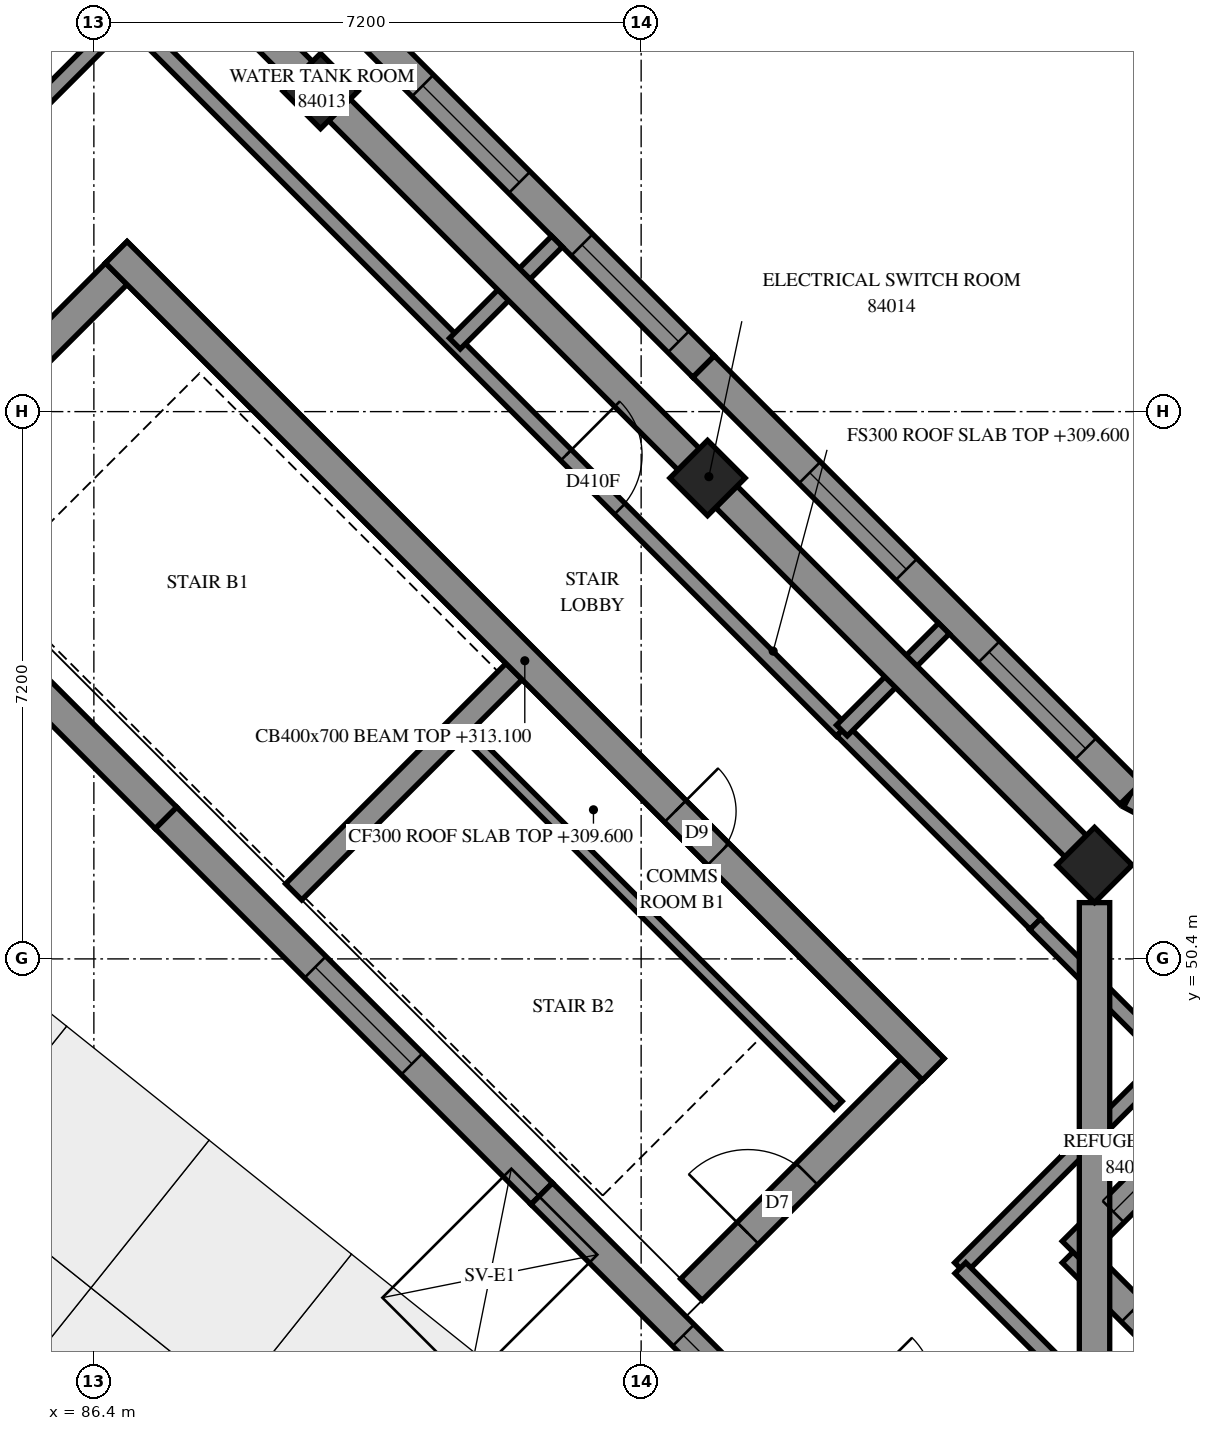
"""IFC4 building model, lengths in metres.
Left out: names, types, materials, properties, quantities, classifications, styles, units other than length and angle.
Written with IfcOpenShell. Run it as: python <this file> out.ifc"""

import sys

from ifc_helpers import new_model, si_unit, direction, frame, frame_2d, origin, origin_2d, place, context, subcontext, project, spatial, polyline, rectangle, outline, extrude, element, fill, save


model = new_model("IFC4")
c1 = context("Model", 3, precision=1e-05, world=origin(), true_north=direction((0.0, 1.0)))
c2 = subcontext(c1, "Body", "Model", "MODEL_VIEW")
j1 = project(units=[si_unit("LENGTHUNIT", "METRE"), si_unit("PLANEANGLEUNIT", "RADIAN")], contexts=[c1])
p1 = place(None, origin())
s1 = spatial("IfcSite", under=j1, at=p1, CompositionType="ELEMENT")
p2 = place(p1, origin())
s2 = spatial("IfcBuilding", under=s1, at=p2, CompositionType="ELEMENT")
p3 = place(p2, frame((0.0, 0.0, 309.6)))
s3 = spatial("IfcBuildingStorey", under=s2, at=p3, CompositionType="ELEMENT", Elevation=309.6)
for number, where, z_axis, x_axis in (
    (1, (89.382, 61.818, 0.0), (0.0, 0.0, 1.0), (0.707, -0.707, 0.0)),
    (2, (94.474, 56.727, 0.0), (0.0, 0.0, 1.0), (0.707, -0.707, 0.0)),
    (3, (99.565, 51.635, 0.0), (0.0, 0.0, 1.0), (0.707, -0.707, 0.0)),
):
    element("IfcColumn", number, at=place(p3, frame(where, z_axis=z_axis, x_axis=x_axis)), inside=s3, PredefinedType="COLUMN", context=c2, shape_type="SweptSolid", body=[
        extrude(rectangle(XDim=0.7, YDim=0.7, at=origin_2d()), origin(), (0.0, 0.0, 1.0), 3.5),
    ])
p4 = place(p3, frame((86.695, 59.696, -0.3), z_axis=(0.0, 0.0, 1.0), x_axis=(0.7071100706, -0.7071034917, 0.0)))
e4 = element("IfcWall", 4, at=p4, inside=s3, PredefinedType="SHEAR", context=c2, shape_type="SweptSolid", body=[
    extrude(outline(polyline([(0.0, 0.0), (15.2, 0.0), (15.2, 3.1), (0.0, 3.1), (0.0, 0.0)])), frame((0.0, 0.2, 0.0), z_axis=(0.0, -1.0, 0.0), x_axis=(1.0, 0.0, 0.0)), (0.0, 0.0, 1.0), 0.4),
])
p5 = place(p4, frame((10.4, 0.0, 0.3)))
e5 = element("IfcOpeningElement", 5, at=p5, cuts=e4, PredefinedType="OPENING", context=c2, shape_type="SweptSolid", body=[
    extrude(rectangle(XDim=0.8, YDim=2.1, at=frame_2d((0.4, 1.05))), frame((0.0, 0.21, 0.0), z_axis=(0.0, -1.0, 0.0), x_axis=(1.0, 0.0, 0.0)), (0.0, 0.0, 1.0), 0.42),
])
p6 = place(p3, frame((83.796, 56.514, -0.3), z_axis=(0.0, 0.0, 1.0), x_axis=(0.7071067812, 0.7071067812, 0.0)))
e6 = element("IfcWall", 6, at=p6, inside=s3, PredefinedType="SHEAR", context=c2, shape_type="SweptSolid", body=[
    extrude(outline(polyline([(0.0, 0.0), (4.1, 0.0), (4.1, 3.1), (0.0, 3.1), (0.0, 0.0)])), frame((0.0, 0.2, 0.0), z_axis=(0.0, -1.0, 0.0), x_axis=(1.0, 0.0, 0.0)), (0.0, 0.0, 1.0), 0.4),
])
p7 = place(p6, frame((1.05, 0.0, 0.3)))
e7 = element("IfcOpeningElement", 7, at=p7, cuts=e6, PredefinedType="OPENING", context=c2, shape_type="SweptSolid", body=[
    extrude(rectangle(XDim=1.1, YDim=2.1, at=frame_2d((0.55, 1.05))), frame((0.0, 0.21, 0.0), z_axis=(0.0, -1.0, 0.0), x_axis=(1.0, 0.0, 0.0)), (0.0, 0.0, 1.0), 0.42),
])
p8 = place(p3, frame((94.261, 46.049, -0.3), z_axis=(0.0, 0.0, 1.0), x_axis=(0.7071067812, 0.7071067812, 0.0)))
e8 = element("IfcWall", 8, at=p8, inside=s3, PredefinedType="SHEAR", context=c2, shape_type="SweptSolid", body=[
    extrude(outline(polyline([(0.0, 0.0), (4.1, 0.0), (4.1, 3.1), (0.0, 3.1), (0.0, 0.0)])), frame((0.0, 0.2, 0.0), z_axis=(0.0, -1.0, 0.0), x_axis=(1.0, 0.0, 0.0)), (0.0, 0.0, 1.0), 0.4),
])
p9 = place(p8, frame((1.05, 0.0, 0.3)))
e9 = element("IfcOpeningElement", 9, at=p9, cuts=e8, PredefinedType="OPENING", context=c2, shape_type="SweptSolid", body=[
    extrude(rectangle(XDim=1.1, YDim=2.1, at=frame_2d((0.55, 1.05))), frame((0.0, 0.21, 0.0), z_axis=(0.0, -1.0, 0.0), x_axis=(1.0, 0.0, 0.0)), (0.0, 0.0, 1.0), 0.42),
])
p10 = place(p3, frame((89.029, 51.282, 0.0), z_axis=(0.0, 0.0, 1.0), x_axis=(0.7071067812, 0.7071067812, 0.0)))
e10 = element("IfcWall", 10, at=p10, inside=s3, PredefinedType="SOLIDWALL", context=c2, shape_type="SweptSolid", body=[
    extrude(outline(polyline([(0.0, 0.0), (4.1, 0.0), (4.1, 3.5), (0.0, 3.5), (0.0, 0.0)])), frame((0.0, 0.15, 0.0), z_axis=(0.0, -1.0, 0.0), x_axis=(1.0, 0.0, 0.0)), (0.0, 0.0, 1.0), 0.3),
])
p11 = place(p3, frame((102.676, 43.15, 0.0), z_axis=(0.0, 0.0, 1.0), x_axis=(-0.7070963646, 0.7071171977, 0.0)))
e11 = element("IfcWall", 11, at=p11, inside=s3, PredefinedType="SOLIDWALL", context=c2, shape_type="SweptSolid", body=[
    extrude(outline(polyline([(-0.2, -0.2), (4.6, -0.2), (5.0, 0.2), (0.2, 0.2), (-0.2, -0.2)])), origin(), (0.0, 0.0, 1.0), 3.5),
])
p12 = place(p11, frame((1.9, 0.0, 0.7)))
e12 = element("IfcOpeningElement", 12, at=p12, cuts=e11, PredefinedType="OPENING", context=c2, shape_type="SweptSolid", body=[
    extrude(rectangle(XDim=1.8, YDim=2.2, at=frame_2d((0.9, 1.1))), frame((0.0, 0.21, 0.0), z_axis=(0.0, -1.0, 0.0), x_axis=(1.0, 0.0, 0.0)), (0.0, 0.0, 1.0), 0.42),
])
p13 = place(p3, frame((99.282, 46.544, 0.0), z_axis=(0.0, 0.0, 1.0), x_axis=(0.7071067812, 0.7071067812, 0.0)))
e13 = element("IfcWall", 13, at=p13, inside=s3, PredefinedType="SOLIDWALL", context=c2, shape_type="SweptSolid", body=[
    extrude(outline(polyline([(0.2, -0.2), (6.23, -0.2), (5.687, 0.2), (-0.2, 0.2), (0.2, -0.2)])), origin(), (0.0, 0.0, 1.0), 3.5),
])
p14 = place(p13, frame((0.75, 0.0, 0.7)))
e14 = element("IfcOpeningElement", 14, at=p14, cuts=e13, PredefinedType="OPENING", context=c2, shape_type="SweptSolid", body=[
    extrude(rectangle(XDim=1.8, YDim=2.2, at=frame_2d((0.9, 1.1))), frame((0.0, 0.21, 0.0), z_axis=(0.0, -1.0, 0.0), x_axis=(1.0, 0.0, 0.0)), (0.0, 0.0, 1.0), 0.42),
])
p15 = place(p3, frame((103.495, 50.757, 0.0), z_axis=(0.0, 0.0, 1.0), x_axis=(-0.8850848595, 0.4654296848, 0.0)))
e15 = element("IfcWall", 15, at=p15, inside=s3, PredefinedType="SOLIDWALL", context=c2, shape_type="SweptSolid", body=[
    extrude(outline(polyline([(-0.272, -0.2), (3.873, -0.2), (3.934, 0.2), (0.272, 0.2), (-0.272, -0.2)])), origin(), (0.0, 0.0, 1.0), 3.5),
])
p16 = place(p15, frame((1.116, 0.0, 0.7)))
e16 = element("IfcOpeningElement", 16, at=p16, cuts=e15, PredefinedType="OPENING", context=c2, shape_type="SweptSolid", body=[
    extrude(rectangle(XDim=1.8, YDim=2.2, at=frame_2d((0.9, 1.1))), frame((0.0, 0.21, 0.0), z_axis=(0.0, -1.0, 0.0), x_axis=(1.0, 0.0, 0.0)), (0.0, 0.0, 1.0), 0.42),
])
p17 = place(p3, frame((100.04, 52.574, 0.0), z_axis=(0.0, 0.0, 1.0), x_axis=(-0.7071004896, 0.7071130728, 0.0)))
e17 = element("IfcWall", 17, at=p17, inside=s3, PredefinedType="SOLIDWALL", context=c2, shape_type="SweptSolid", body=[
    extrude(outline(polyline([(0.03, -0.2), (7.947, -0.2), (7.947, 0.2), (-0.03, 0.2), (0.03, -0.2)])), origin(), (0.0, 0.0, 1.0), 3.5),
])
p18 = place(p17, frame((0.836, 0.0, 0.7)))
e18 = element("IfcOpeningElement", 18, at=p18, cuts=e17, PredefinedType="OPENING", context=c2, shape_type="SweptSolid", body=[
    extrude(rectangle(XDim=1.8, YDim=2.2, at=frame_2d((0.9, 1.1))), frame((0.0, 0.21, 0.0), z_axis=(0.0, -1.0, 0.0), x_axis=(1.0, 0.0, 0.0)), (0.0, 0.0, 1.0), 0.42),
])
p19 = place(p17, frame((4.172, 0.0, 0.7)))
e19 = element("IfcOpeningElement", 19, at=p19, cuts=e17, PredefinedType="OPENING", context=c2, shape_type="SweptSolid", body=[
    extrude(rectangle(XDim=1.8, YDim=2.2, at=frame_2d((0.9, 1.1))), frame((0.0, 0.21, 0.0), z_axis=(0.0, -1.0, 0.0), x_axis=(1.0, 0.0, 0.0)), (0.0, 0.0, 1.0), 0.42),
])
p20 = place(p3, frame((94.42, 58.194, 0.0), z_axis=(0.0, 0.0, 1.0), x_axis=(-0.7071067812, 0.7071067812, 0.0)))
e20 = element("IfcWall", 20, at=p20, inside=s3, PredefinedType="SOLIDWALL", context=c2, shape_type="SweptSolid", body=[
    extrude(outline(polyline([(0.0, -0.2), (7.917, -0.2), (7.917, 0.2), (0.0, 0.2), (0.0, -0.2)])), origin(), (0.0, 0.0, 1.0), 3.5),
])
p21 = place(p20, frame((0.462, 0.0, 0.7)))
e21 = element("IfcOpeningElement", 21, at=p21, cuts=e20, PredefinedType="OPENING", context=c2, shape_type="SweptSolid", body=[
    extrude(rectangle(XDim=1.8, YDim=2.2, at=frame_2d((0.9, 1.1))), frame((0.0, 0.21, 0.0), z_axis=(0.0, -1.0, 0.0), x_axis=(1.0, 0.0, 0.0)), (0.0, 0.0, 1.0), 0.42),
])
p22 = place(p20, frame((3.425, 0.0, 0.7)))
e22 = element("IfcOpeningElement", 22, at=p22, cuts=e20, PredefinedType="OPENING", context=c2, shape_type="SweptSolid", body=[
    extrude(rectangle(XDim=1.8, YDim=2.2, at=frame_2d((0.9, 1.1))), frame((0.0, 0.21, 0.0), z_axis=(0.0, -1.0, 0.0), x_axis=(1.0, 0.0, 0.0)), (0.0, 0.0, 1.0), 0.42),
])
p23 = place(p3, frame((82.406, 57.197, 0.0), z_axis=(0.0, 0.0, 1.0), x_axis=(0.7071067812, -0.7071067812, 0.0)))
e23 = element("IfcWall", 23, at=p23, inside=s3, PredefinedType="SOLIDWALL", context=c2, shape_type="SweptSolid", body=[
    extrude(outline(polyline([(0.0, -0.2), (6.99, -0.2), (6.99, 0.2), (0.0, 0.2), (0.0, -0.2)])), origin(), (0.0, 0.0, 1.0), 3.5),
])
p24 = place(p23, frame((2.565, 0.0, 0.7)))
e24 = element("IfcOpeningElement", 24, at=p24, cuts=e23, PredefinedType="OPENING", context=c2, shape_type="SweptSolid", body=[
    extrude(rectangle(XDim=1.8, YDim=2.2, at=frame_2d((0.9, 1.1))), frame((0.0, 0.21, 0.0), z_axis=(0.0, -1.0, 0.0), x_axis=(1.0, 0.0, 0.0)), (0.0, 0.0, 1.0), 0.42),
])
p25 = place(p3, frame((87.349, 52.254, 0.0), z_axis=(0.0, 0.0, 1.0), x_axis=(0.7071139341, -0.7070996282, 0.0)))
e25 = element("IfcWall", 25, at=p25, inside=s3, PredefinedType="SOLIDWALL", context=c2, shape_type="SweptSolid", body=[
    extrude(outline(polyline([(0.0, -0.2), (6.99, -0.2), (6.99, 0.2), (0.0, 0.2), (0.0, -0.2)])), origin(), (0.0, 0.0, 1.0), 3.5),
])
p26 = place(p25, frame((2.775, 0.0, 0.7)))
e26 = element("IfcOpeningElement", 26, at=p26, cuts=e25, PredefinedType="OPENING", context=c2, shape_type="SweptSolid", body=[
    extrude(rectangle(XDim=1.8, YDim=2.2, at=frame_2d((0.9, 1.1))), frame((0.0, 0.21, 0.0), z_axis=(0.0, -1.0, 0.0), x_axis=(1.0, 0.0, 0.0)), (0.0, 0.0, 1.0), 0.42),
])
p27 = place(p3, frame((92.292, 47.312, 0.0), z_axis=(0.0, 0.0, 1.0), x_axis=(0.707099663, -0.7071138993, 0.0)))
e27 = element("IfcWall", 27, at=p27, inside=s3, PredefinedType="SOLIDWALL", context=c2, shape_type="SweptSolid", body=[
    extrude(outline(polyline([(0.0, -0.2), (6.99, -0.2), (7.059, 0.2), (0.0, 0.2), (0.0, -0.2)])), origin(), (0.0, 0.0, 1.0), 3.5),
])
p28 = place(p27, frame((2.635, 0.0, 0.7)))
e28 = element("IfcOpeningElement", 28, at=p28, cuts=e27, PredefinedType="OPENING", context=c2, shape_type="SweptSolid", body=[
    extrude(rectangle(XDim=1.8, YDim=2.2, at=frame_2d((0.9, 1.1))), frame((0.0, 0.21, 0.0), z_axis=(0.0, -1.0, 0.0), x_axis=(1.0, 0.0, 0.0)), (0.0, 0.0, 1.0), 0.42),
])
p29 = place(p3, frame((91.313, 53.354, 0.0), z_axis=(0.0, 0.0, 1.0), x_axis=(0.7071140275, -0.7070995348, 0.0)))
e29 = element("IfcWall", 29, at=p29, inside=s3, PredefinedType="PARTITIONING", context=c2, shape_type="SweptSolid", body=[
    extrude(outline(polyline([(0.0, 0.0), (6.9, 0.0), (6.9, 3.5), (0.0, 3.5), (0.0, 0.0)])), frame((0.0, 0.075, 0.0), z_axis=(0.0, -1.0, 0.0), x_axis=(1.0, 0.0, 0.0)), (0.0, 0.0, 1.0), 0.15),
])
p30 = place(p3, frame((86.835, 62.803, 0.0), z_axis=(0.0, 0.0, 1.0), x_axis=(0.7072045346, -0.7070090143, 0.0)))
e30 = element("IfcWall", 30, at=p30, inside=s3, PredefinedType="PARTITIONING", context=c2, shape_type="SweptSolid", body=[
    extrude(rectangle(XDim=13.298, YDim=0.2, at=frame_2d((6.649, 0.0))), origin(), (0.0, 0.0, 1.0), 3.5),
])
p31 = place(p30, frame((8.169, 0.0, 0.0)))
e31 = element("IfcOpeningElement", 31, at=p31, cuts=e30, PredefinedType="OPENING", context=c2, shape_type="SweptSolid", body=[
    extrude(rectangle(XDim=1.0, YDim=2.1, at=frame_2d((0.5, 1.05))), frame((0.0, 0.11, 0.0), z_axis=(0.0, -1.0, 0.0), x_axis=(1.0, 0.0, 0.0)), (0.0, 0.0, 1.0), 0.22),
])
p32 = place(p3, frame((97.796, 46.332, 0.0), z_axis=(0.0, 0.0, 1.0), x_axis=(0.7071067812, 0.7071067812, 0.0)))
e32 = element("IfcWall", 32, at=p32, inside=s3, PredefinedType="PARTITIONING", context=c2, shape_type="SweptSolid", body=[
    extrude(rectangle(XDim=3.9, YDim=0.2, at=frame_2d((1.95, 0.0))), origin(), (0.0, 0.0, 1.0), 3.5),
])
p33 = place(p3, frame((84.079, 60.051, 0.0), z_axis=(0.0, 0.0, 1.0), x_axis=(0.7071067812, 0.7071067812, 0.0)))
e33 = element("IfcWall", 33, at=p33, inside=s3, PredefinedType="PARTITIONING", context=c2, shape_type="SweptSolid", body=[
    extrude(rectangle(XDim=3.898, YDim=0.2, at=frame_2d((1.949, 0.0))), origin(), (0.0, 0.0, 1.0), 3.5),
])
p34 = place(p33, frame((0.209, 0.0, 0.0)))
e34 = element("IfcOpeningElement", 34, at=p34, cuts=e33, PredefinedType="OPENING", context=c2, shape_type="SweptSolid", body=[
    extrude(rectangle(XDim=1.0, YDim=2.1, at=frame_2d((0.5, 1.05))), frame((0.0, 0.11, 0.0), z_axis=(0.0, -1.0, 0.0), x_axis=(1.0, 0.0, 0.0)), (0.0, 0.0, 1.0), 0.22),
])
p35 = place(p3, frame((96.244, 53.406, 0.0), z_axis=(0.0, 0.0, 1.0), x_axis=(0.7068288851, -0.7073845681, 0.0)))
e35 = element("IfcWall", 35, at=p35, inside=s3, PredefinedType="PARTITIONING", context=c2, shape_type="SweptSolid", body=[
    extrude(rectangle(XDim=3.599, YDim=0.2, at=frame_2d((1.8, 0.0))), origin(), (0.0, 0.0, 1.0), 3.5),
])
p36 = place(p3, frame((98.783, 50.855, 0.0), z_axis=(0.0, 0.0, 1.0), x_axis=(0.7071067812, -0.7071067812, 0.0)))
e36 = element("IfcWall", 36, at=p36, inside=s3, PredefinedType="PARTITIONING", context=c2, shape_type="SweptSolid", body=[
    extrude(rectangle(XDim=2.5, YDim=0.2, at=frame_2d((1.25, 0.0))), origin(), (0.0, 0.0, 1.0), 3.5),
])
p37 = place(p3, frame((97.8, 46.334, 0.0), z_axis=(0.0, 0.0, 1.0), x_axis=(0.7066809416, -0.7075323644, 0.0)))
e37 = element("IfcWall", 37, at=p37, inside=s3, PredefinedType="PARTITIONING", context=c2, shape_type="SweptSolid", body=[
    extrude(rectangle(XDim=2.349, YDim=0.2, at=frame_2d((1.175, 0.0))), origin(), (0.0, 0.0, 1.0), 3.5),
])
p38 = place(p3, frame((83.301, 60.829, 0.0), z_axis=(0.0, 0.0, 1.0), x_axis=(0.7071067812, 0.7071067812, 0.0)))
e38 = element("IfcWall", 38, at=p38, inside=s3, PredefinedType="PARTITIONING", context=c2, shape_type="SweptSolid", body=[
    extrude(outline(polyline([(0.0, -0.1), (5.799, -0.1), (5.799, 0.1), (0.0, 0.1), (0.0, -0.1)])), origin(), (0.0, 0.0, 1.0), 3.5),
])
p39 = place(p3, frame((91.149, 58.495, 0.0), z_axis=(0.0, 0.0, 1.0), x_axis=(0.7071067812, 0.7071067812, 0.0)))
e39 = element("IfcWall", 39, at=p39, inside=s3, PredefinedType="PARTITIONING", context=c2, shape_type="SweptSolid", body=[
    extrude(outline(polyline([(0.0, -0.1), (1.9, -0.1), (1.9, 0.1), (0.0, 0.1), (0.0, -0.1)])), origin(), (0.0, 0.0, 1.0), 3.5),
])
p40 = place(p3, frame((96.241, 53.405, 0.0), z_axis=(0.0, 0.0, 1.0), x_axis=(0.7071067812, 0.7071067812, 0.0)))
e40 = element("IfcWall", 40, at=p40, inside=s3, PredefinedType="PARTITIONING", context=c2, shape_type="SweptSolid", body=[
    extrude(outline(polyline([(0.0, -0.1), (1.899, -0.1), (1.899, 0.1), (0.0, 0.1), (0.0, -0.1)])), origin(), (0.0, 0.0, 1.0), 3.5),
])
p41 = place(p12, origin())
e41 = element("IfcWindow", 41, at=p41, inside=s3, PartitioningType="SINGLE_PANEL", PredefinedType="WINDOW", context=c2, shape_type="SweptSolid", body=[
    extrude(rectangle(XDim=1.8, YDim=2.2, at=frame_2d((0.9, 1.1))), frame((0.0, 0.08, 0.0), z_axis=(0.0, -1.0, 0.0), x_axis=(1.0, 0.0, 0.0)), (0.0, 0.0, 1.0), 0.06),
])
fill(e12, e41)
p42 = place(p14, origin())
e42 = element("IfcWindow", 42, at=p42, inside=s3, PartitioningType="SINGLE_PANEL", PredefinedType="WINDOW", context=c2, shape_type="SweptSolid", body=[
    extrude(rectangle(XDim=1.8, YDim=2.2, at=frame_2d((0.9, 1.1))), frame((0.0, 0.08, 0.0), z_axis=(0.0, -1.0, 0.0), x_axis=(1.0, 0.0, 0.0)), (0.0, 0.0, 1.0), 0.06),
])
fill(e14, e42)
p43 = place(p18, origin())
e43 = element("IfcWindow", 43, at=p43, inside=s3, PartitioningType="SINGLE_PANEL", PredefinedType="WINDOW", context=c2, shape_type="SweptSolid", body=[
    extrude(rectangle(XDim=1.8, YDim=2.2, at=frame_2d((0.9, 1.1))), frame((0.0, 0.08, 0.0), z_axis=(0.0, -1.0, 0.0), x_axis=(1.0, 0.0, 0.0)), (0.0, 0.0, 1.0), 0.06),
])
fill(e18, e43)
p44 = place(p19, origin())
e44 = element("IfcWindow", 44, at=p44, inside=s3, PartitioningType="SINGLE_PANEL", PredefinedType="WINDOW", context=c2, shape_type="SweptSolid", body=[
    extrude(rectangle(XDim=1.8, YDim=2.2, at=frame_2d((0.9, 1.1))), frame((0.0, 0.08, 0.0), z_axis=(0.0, -1.0, 0.0), x_axis=(1.0, 0.0, 0.0)), (0.0, 0.0, 1.0), 0.06),
])
fill(e19, e44)
p45 = place(p21, origin())
e45 = element("IfcWindow", 45, at=p45, inside=s3, PartitioningType="SINGLE_PANEL", PredefinedType="WINDOW", context=c2, shape_type="SweptSolid", body=[
    extrude(rectangle(XDim=1.8, YDim=2.2, at=frame_2d((0.9, 1.1))), frame((0.0, 0.08, 0.0), z_axis=(0.0, -1.0, 0.0), x_axis=(1.0, 0.0, 0.0)), (0.0, 0.0, 1.0), 0.06),
])
fill(e21, e45)
p46 = place(p22, origin())
e46 = element("IfcWindow", 46, at=p46, inside=s3, PartitioningType="SINGLE_PANEL", PredefinedType="WINDOW", context=c2, shape_type="SweptSolid", body=[
    extrude(rectangle(XDim=1.8, YDim=2.2, at=frame_2d((0.9, 1.1))), frame((0.0, 0.08, 0.0), z_axis=(0.0, -1.0, 0.0), x_axis=(1.0, 0.0, 0.0)), (0.0, 0.0, 1.0), 0.06),
])
fill(e22, e46)
p47 = place(p26, origin())
e47 = element("IfcWindow", 47, at=p47, inside=s3, PartitioningType="SINGLE_PANEL", PredefinedType="WINDOW", context=c2, shape_type="SweptSolid", body=[
    extrude(rectangle(XDim=1.8, YDim=2.2, at=frame_2d((0.9, 1.1))), frame((0.0, 0.08, 0.0), z_axis=(0.0, -1.0, 0.0), x_axis=(1.0, 0.0, 0.0)), (0.0, 0.0, 1.0), 0.06),
])
fill(e26, e47)
p48 = place(p28, origin())
e48 = element("IfcWindow", 48, at=p48, inside=s3, PartitioningType="SINGLE_PANEL", PredefinedType="WINDOW", context=c2, shape_type="SweptSolid", body=[
    extrude(rectangle(XDim=1.8, YDim=2.2, at=frame_2d((0.9, 1.1))), frame((0.0, 0.08, 0.0), z_axis=(0.0, -1.0, 0.0), x_axis=(1.0, 0.0, 0.0)), (0.0, 0.0, 1.0), 0.06),
])
fill(e28, e48)
p49 = place(p5, origin())
e49 = element("IfcDoor", 49, at=p49, inside=s3, OperationType="SINGLE_SWING_RIGHT", PredefinedType="DOOR", context=c2, shape_type="SweptSolid", body=[
    extrude(rectangle(XDim=0.8, YDim=2.1, at=frame_2d((0.4, 1.05))), frame((0.0, 0.025, 0.0), z_axis=(0.0, -1.0, 0.0), x_axis=(1.0, 0.0, 0.0)), (0.0, 0.0, 1.0), 0.05),
])
fill(e5, e49)
p50 = place(p9, origin())
e50 = element("IfcDoor", 50, at=p50, inside=s3, OperationType="SINGLE_SWING_RIGHT", PredefinedType="DOOR", context=c2, shape_type="SweptSolid", body=[
    extrude(rectangle(XDim=1.1, YDim=2.1, at=frame_2d((0.55, 1.05))), frame((0.0, 0.025, 0.0), z_axis=(0.0, -1.0, 0.0), x_axis=(1.0, 0.0, 0.0)), (0.0, 0.0, 1.0), 0.05),
])
fill(e9, e50)
p51 = place(p31, origin())
e51 = element("IfcDoor", 51, at=p51, inside=s3, OperationType="SINGLE_SWING_RIGHT", PredefinedType="DOOR", context=c2, shape_type="SweptSolid", body=[
    extrude(rectangle(XDim=1.0, YDim=2.1, at=frame_2d((0.5, 1.05))), frame((0.0, 0.025, 0.0), z_axis=(0.0, -1.0, 0.0), x_axis=(1.0, 0.0, 0.0)), (0.0, 0.0, 1.0), 0.05),
])
fill(e31, e51)
save(model, sys.argv[1])
